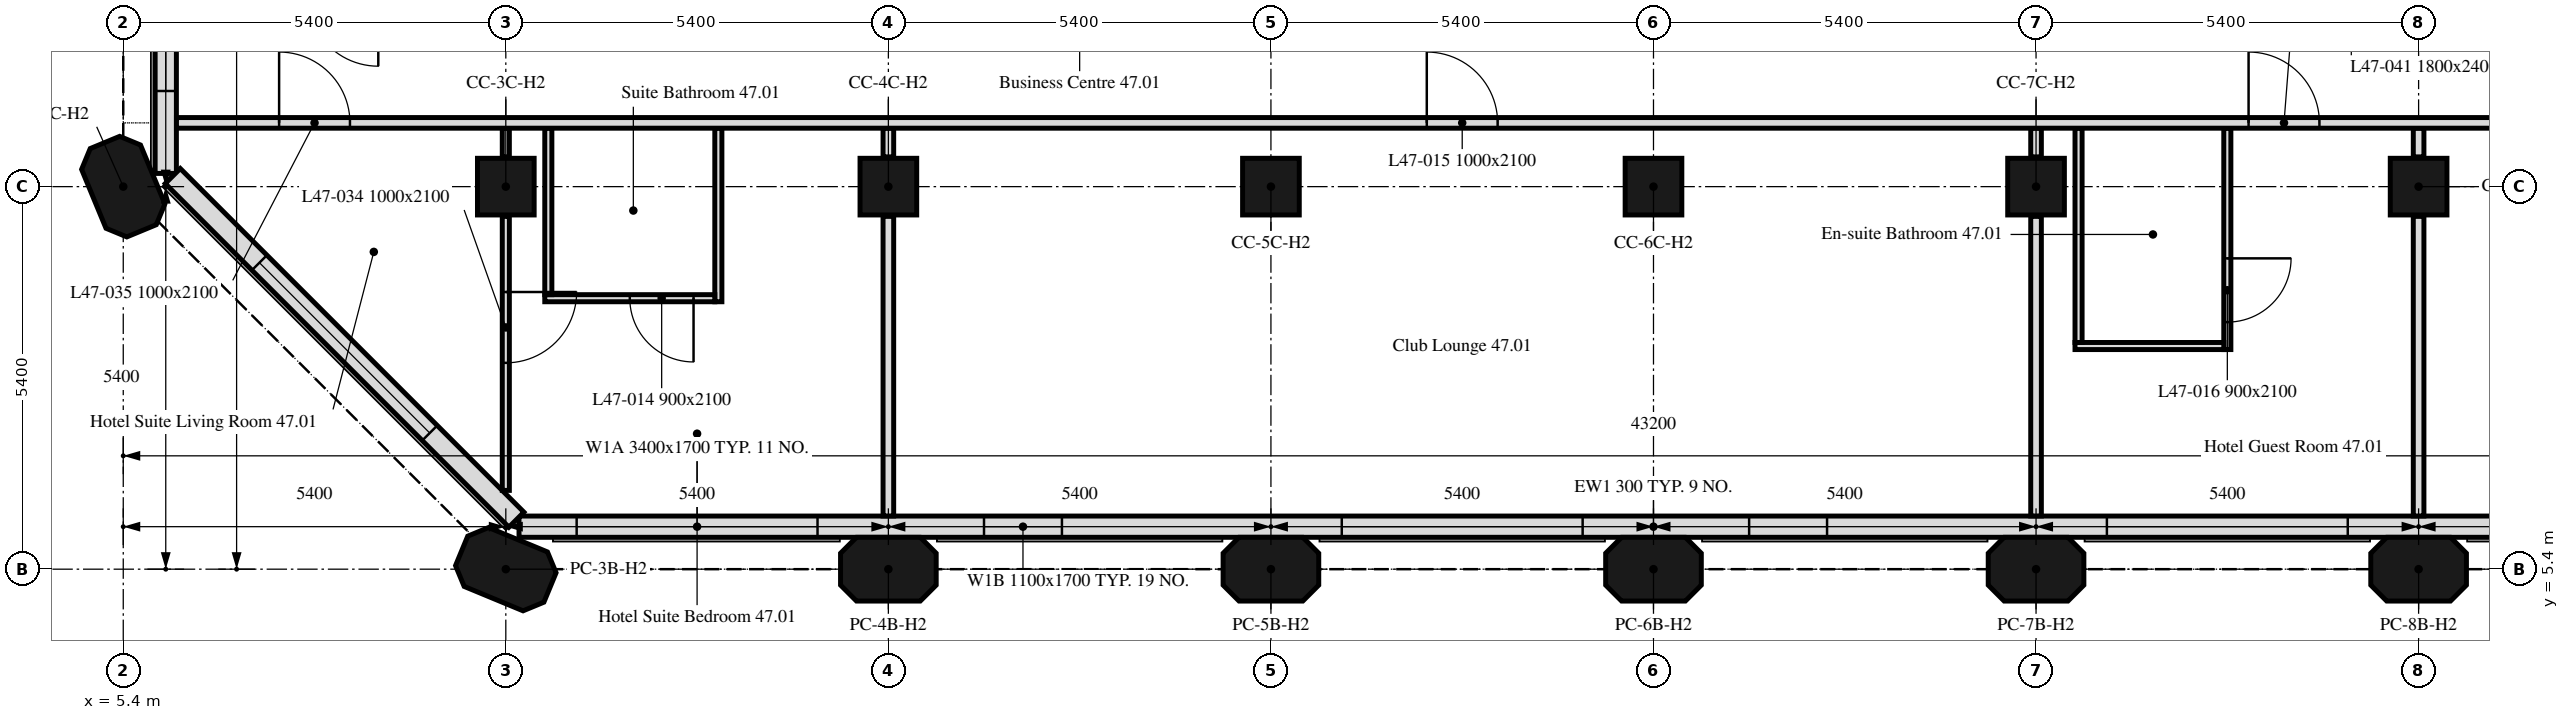
"""IFC4 building model, lengths in metres.
Left out: names, types, materials, properties, quantities, classifications, styles, units other than length and angle.
Written with IfcOpenShell. Run it as: python <this file> out.ifc"""

import sys

from ifc_helpers import new_model, si_unit, direction, frame, frame_2d, origin, origin_2d, place, context, subcontext, project, spatial, polyline, rectangle, outline, extrude, element, fill, save


model = new_model("IFC4")
c1 = context("Model", 3, precision=1e-05, world=origin(), true_north=direction((0.0, 1.0)))
c2 = subcontext(c1, "Body", "Model", "MODEL_VIEW")
j1 = project(units=[si_unit("LENGTHUNIT", "METRE"), si_unit("PLANEANGLEUNIT", "RADIAN")], contexts=[c1])
p1 = place(None, origin())
s1 = spatial("IfcSite", under=j1, at=p1, CompositionType="ELEMENT")
p2 = place(p1, origin())
s2 = spatial("IfcBuilding", under=s1, at=p2, CompositionType="ELEMENT")
p3 = place(p2, frame((0.0, 0.0, 193.9)))
s3 = spatial("IfcBuildingStorey", under=s2, at=p3, CompositionType="ELEMENT", Elevation=193.9)
for number, where, z_axis, x_axis in (
    (1, (10.8, 5.4, 0.0), (0.0, 0.0, 1.0), (-0.924, 0.383, 0.0)),
    (2, (16.2, 5.4, 0.0), (0.0, 0.0, 1.0), (1.0, 0.0, 0.0)),
    (3, (21.6, 5.4, 0.0), (0.0, 0.0, 1.0), (1.0, 0.0, 0.0)),
    (4, (27.0, 5.4, 0.0), (0.0, 0.0, 1.0), (1.0, 0.0, 0.0)),
    (5, (32.4, 5.4, 0.0), (0.0, 0.0, 1.0), (1.0, 0.0, 0.0)),
    (6, (37.8, 5.4, 0.0), (0.0, 0.0, 1.0), (1.0, 0.0, 0.0)),
    (7, (5.4, 10.8, 0.0), (0.0, 0.0, 1.0), (-0.383, 0.924, 0.0)),
):
    element("IfcColumn", number, at=place(p3, frame(where, z_axis=z_axis, x_axis=x_axis)), inside=s3, PredefinedType="COLUMN", context=c2, shape_type="SweptSolid", body=[
        extrude(outline(polyline([(-0.45, -0.45), (0.45, -0.45), (0.675, -0.225), (0.675, 0.225), (0.45, 0.45), (-0.45, 0.45), (-0.675, 0.225), (-0.675, -0.225), (-0.45, -0.45)])), origin(), (0.0, 0.0, 1.0), 3.0),
    ])
for number, where, z_axis, x_axis in (
    (8, (10.8, 10.8, 0.0), (0.0, 0.0, 1.0), (1.0, 0.0, 0.0)),
    (9, (16.2, 10.8, 0.0), (0.0, 0.0, 1.0), (1.0, 0.0, 0.0)),
    (10, (21.6, 10.8, 0.0), (0.0, 0.0, 1.0), (1.0, 0.0, 0.0)),
    (11, (27.0, 10.8, 0.0), (0.0, 0.0, 1.0), (1.0, 0.0, 0.0)),
    (12, (32.4, 10.8, 0.0), (0.0, 0.0, 1.0), (1.0, 0.0, 0.0)),
    (13, (37.8, 10.8, 0.0), (0.0, 0.0, 1.0), (1.0, 0.0, 0.0)),
):
    element("IfcColumn", number, at=place(p3, frame(where, z_axis=z_axis, x_axis=x_axis)), inside=s3, PredefinedType="COLUMN", context=c2, shape_type="SweptSolid", body=[
        extrude(rectangle(XDim=0.8, YDim=0.8, at=origin_2d()), origin(), (0.0, 0.0, 1.0), 3.0),
    ])
p4 = place(p3, frame((10.986, 6.0, 0.0), z_axis=(0.0, 0.0, 1.0), x_axis=(1.0, 0.0, 0.0)))
e14 = element("IfcWall", 14, at=p4, inside=s3, PredefinedType="SOLIDWALL", context=c2, shape_type="SweptSolid", body=[
    extrude(rectangle(XDim=32.027, YDim=0.3, at=frame_2d((16.014, 0.0))), origin(), (0.0, 0.0, 1.0), 3.0),
])
p5 = place(p4, frame((0.814, 0.0, 0.9)))
e15 = element("IfcOpeningElement", 15, at=p5, cuts=e14, PredefinedType="OPENING", context=c2, shape_type="SweptSolid", body=[
    extrude(rectangle(XDim=3.4, YDim=1.7, at=frame_2d((1.7, 0.85))), frame((0.0, 0.16, 0.0), z_axis=(0.0, -1.0, 0.0), x_axis=(1.0, 0.0, 0.0)), (0.0, 0.0, 1.0), 0.32),
])
p6 = place(p4, frame((6.564, 0.0, 0.9)))
e16 = element("IfcOpeningElement", 16, at=p6, cuts=e14, PredefinedType="OPENING", context=c2, shape_type="SweptSolid", body=[
    extrude(rectangle(XDim=1.1, YDim=1.7, at=frame_2d((0.55, 0.85))), frame((0.0, 0.16, 0.0), z_axis=(0.0, -1.0, 0.0), x_axis=(1.0, 0.0, 0.0)), (0.0, 0.0, 1.0), 0.32),
])
p7 = place(p4, frame((11.614, 0.0, 0.9)))
e17 = element("IfcOpeningElement", 17, at=p7, cuts=e14, PredefinedType="OPENING", context=c2, shape_type="SweptSolid", body=[
    extrude(rectangle(XDim=3.4, YDim=1.7, at=frame_2d((1.7, 0.85))), frame((0.0, 0.16, 0.0), z_axis=(0.0, -1.0, 0.0), x_axis=(1.0, 0.0, 0.0)), (0.0, 0.0, 1.0), 0.32),
])
p8 = place(p4, frame((17.364, 0.0, 0.9)))
e18 = element("IfcOpeningElement", 18, at=p8, cuts=e14, PredefinedType="OPENING", context=c2, shape_type="SweptSolid", body=[
    extrude(rectangle(XDim=1.1, YDim=1.7, at=frame_2d((0.55, 0.85))), frame((0.0, 0.16, 0.0), z_axis=(0.0, -1.0, 0.0), x_axis=(1.0, 0.0, 0.0)), (0.0, 0.0, 1.0), 0.32),
])
p9 = place(p4, frame((22.414, 0.0, 0.9)))
e19 = element("IfcOpeningElement", 19, at=p9, cuts=e14, PredefinedType="OPENING", context=c2, shape_type="SweptSolid", body=[
    extrude(rectangle(XDim=3.4, YDim=1.7, at=frame_2d((1.7, 0.85))), frame((0.0, 0.16, 0.0), z_axis=(0.0, -1.0, 0.0), x_axis=(1.0, 0.0, 0.0)), (0.0, 0.0, 1.0), 0.32),
])
p10 = place(p4, frame((28.164, 0.0, 0.9)))
e20 = element("IfcOpeningElement", 20, at=p10, cuts=e14, PredefinedType="OPENING", context=c2, shape_type="SweptSolid", body=[
    extrude(rectangle(XDim=1.1, YDim=1.7, at=frame_2d((0.55, 0.85))), frame((0.0, 0.16, 0.0), z_axis=(0.0, -1.0, 0.0), x_axis=(1.0, 0.0, 0.0)), (0.0, 0.0, 1.0), 0.32),
])
p11 = place(p3, frame((6.0, 16.2, 0.0), z_axis=(0.0, 0.0, 1.0), x_axis=(0.0, -1.0, 0.0)))
e21 = element("IfcWall", 21, at=p11, inside=s3, PredefinedType="SOLIDWALL", context=c2, shape_type="SweptSolid", body=[
    extrude(rectangle(XDim=5.214, YDim=0.3, at=frame_2d((2.607, 0.0))), origin(), (0.0, 0.0, 1.0), 3.0),
])
p12 = place(p11, frame((1.35, 0.0, 0.9)))
e22 = element("IfcOpeningElement", 22, at=p12, cuts=e21, PredefinedType="OPENING", context=c2, shape_type="SweptSolid", body=[
    extrude(rectangle(XDim=1.1, YDim=1.7, at=frame_2d((0.55, 0.85))), frame((0.0, 0.16, 0.0), z_axis=(0.0, -1.0, 0.0), x_axis=(1.0, 0.0, 0.0)), (0.0, 0.0, 1.0), 0.32),
])
p13 = place(p11, frame((2.95, 0.0, 0.9)))
e23 = element("IfcOpeningElement", 23, at=p13, cuts=e21, PredefinedType="OPENING", context=c2, shape_type="SweptSolid", body=[
    extrude(rectangle(XDim=1.1, YDim=1.7, at=frame_2d((0.55, 0.85))), frame((0.0, 0.16, 0.0), z_axis=(0.0, -1.0, 0.0), x_axis=(1.0, 0.0, 0.0)), (0.0, 0.0, 1.0), 0.32),
])
p14 = place(p3, frame((6.099, 10.949, 0.0), z_axis=(0.0, 0.0, 1.0), x_axis=(0.707106781187, -0.707106781187, 0.0)))
e24 = element("IfcWall", 24, at=p14, inside=s3, PredefinedType="SOLIDWALL", context=c2, shape_type="SweptSolid", body=[
    extrude(rectangle(XDim=6.86, YDim=0.3, at=frame_2d((3.43, 0.0))), origin(), (0.0, 0.0, 1.0), 3.0),
])
p15 = place(p14, frame((1.73, 0.0, 0.9)))
e25 = element("IfcOpeningElement", 25, at=p15, cuts=e24, PredefinedType="OPENING", context=c2, shape_type="SweptSolid", body=[
    extrude(rectangle(XDim=3.4, YDim=1.7, at=frame_2d((1.7, 0.85))), frame((0.0, 0.16, 0.0), z_axis=(0.0, -1.0, 0.0), x_axis=(1.0, 0.0, 0.0)), (0.0, 0.0, 1.0), 0.32),
])
p16 = place(p3, frame((16.2, 6.151, 0.0), z_axis=(0.0, 0.0, 1.0), x_axis=(0.0, 1.0, 0.0)))
e26 = element("IfcWall", 26, at=p16, inside=s3, PredefinedType="PARTITIONING", context=c2, shape_type="SweptSolid", body=[
    extrude(rectangle(XDim=4.229, YDim=0.15, at=frame_2d((2.115, 0.0))), origin(), (0.0, 0.0, 1.0), 3.0),
])
p17 = place(p3, frame((16.2, 11.22, 0.0), z_axis=(0.0, 0.0, 1.0), x_axis=(0.0, 1.0, 0.0)))
e27 = element("IfcWall", 27, at=p17, inside=s3, PredefinedType="PARTITIONING", context=c2, shape_type="SweptSolid", body=[
    extrude(rectangle(XDim=0.405, YDim=0.15, at=frame_2d((0.203, 0.0))), origin(), (0.0, 0.0, 1.0), 3.0),
])
p18 = place(p3, frame((13.8, 11.625, 0.0), z_axis=(0.0, 0.0, 1.0), x_axis=(0.0, -1.0, 0.0)))
e28 = element("IfcWall", 28, at=p18, inside=s3, PredefinedType="PARTITIONING", context=c2, shape_type="SweptSolid", body=[
    extrude(rectangle(XDim=2.45, YDim=0.1, at=frame_2d((1.225, 0.0))), origin(), (0.0, 0.0, 1.0), 3.0),
])
p19 = place(p3, frame((13.75, 9.225, 0.0), z_axis=(0.0, 0.0, 1.0), x_axis=(-1.0, 0.0, 0.0)))
e29 = element("IfcWall", 29, at=p19, inside=s3, PredefinedType="PARTITIONING", context=c2, shape_type="SweptSolid", body=[
    extrude(rectangle(XDim=2.4, YDim=0.1, at=frame_2d((1.2, 0.0))), origin(), (0.0, 0.0, 1.0), 3.0),
])
p20 = place(p19, frame((0.3, 0.0, 0.0)))
e30 = element("IfcOpeningElement", 30, at=p20, cuts=e29, PredefinedType="OPENING", context=c2, shape_type="SweptSolid", body=[
    extrude(rectangle(XDim=0.9, YDim=2.1, at=frame_2d((0.45, 1.05))), frame((0.0, 0.05, 0.0), z_axis=(0.0, -1.0, 0.0), x_axis=(1.0, 0.0, 0.0)), (0.0, 0.0, 1.0), 0.1),
])
p21 = place(p3, frame((11.4, 9.275, 0.0), z_axis=(0.0, 0.0, 1.0), x_axis=(0.0, 1.0, 0.0)))
e31 = element("IfcWall", 31, at=p21, inside=s3, PredefinedType="PARTITIONING", context=c2, shape_type="SweptSolid", body=[
    extrude(rectangle(XDim=2.35, YDim=0.1, at=frame_2d((1.175, 0.0))), origin(), (0.0, 0.0, 1.0), 3.0),
])
p22 = place(p3, frame((10.8, 11.625, 0.0), z_axis=(0.0, 0.0, 1.0), x_axis=(0.0, -1.0, 0.0)))
e32 = element("IfcWall", 32, at=p22, inside=s3, PredefinedType="PARTITIONING", context=c2, shape_type="SweptSolid", body=[
    extrude(rectangle(XDim=0.405, YDim=0.1, at=frame_2d((0.203, 0.0))), origin(), (0.0, 0.0, 1.0), 3.0),
])
p23 = place(p3, frame((10.8, 10.38, 0.0), z_axis=(0.0, 0.0, 1.0), x_axis=(0.0, -1.0, 0.0)))
e33 = element("IfcWall", 33, at=p23, inside=s3, PredefinedType="PARTITIONING", context=c2, shape_type="SweptSolid", body=[
    extrude(rectangle(XDim=3.868, YDim=0.1, at=frame_2d((1.934, 0.0))), origin(), (0.0, 0.0, 1.0), 3.0),
])
p24 = place(p23, frame((1.067, 0.0, 0.0)))
e34 = element("IfcOpeningElement", 34, at=p24, cuts=e33, PredefinedType="OPENING", context=c2, shape_type="SweptSolid", body=[
    extrude(rectangle(XDim=1.0, YDim=2.1, at=frame_2d((0.5, 1.05))), frame((0.0, 0.05, 0.0), z_axis=(0.0, -1.0, 0.0), x_axis=(1.0, 0.0, 0.0)), (0.0, 0.0, 1.0), 0.1),
])
p25 = place(p3, frame((32.4, 6.151, 0.0), z_axis=(0.0, 0.0, 1.0), x_axis=(0.0, 1.0, 0.0)))
e35 = element("IfcWall", 35, at=p25, inside=s3, PredefinedType="PARTITIONING", context=c2, shape_type="SweptSolid", body=[
    extrude(rectangle(XDim=4.229, YDim=0.15, at=frame_2d((2.115, 0.0))), origin(), (0.0, 0.0, 1.0), 3.0),
])
p26 = place(p3, frame((32.4, 11.22, 0.0), z_axis=(0.0, 0.0, 1.0), x_axis=(0.0, 1.0, 0.0)))
e36 = element("IfcWall", 36, at=p26, inside=s3, PredefinedType="PARTITIONING", context=c2, shape_type="SweptSolid", body=[
    extrude(rectangle(XDim=0.405, YDim=0.15, at=frame_2d((0.203, 0.0))), origin(), (0.0, 0.0, 1.0), 3.0),
])
p27 = place(p3, frame((37.8, 6.151, 0.0), z_axis=(0.0, 0.0, 1.0), x_axis=(0.0, 1.0, 0.0)))
e37 = element("IfcWall", 37, at=p27, inside=s3, PredefinedType="PARTITIONING", context=c2, shape_type="SweptSolid", body=[
    extrude(rectangle(XDim=4.229, YDim=0.15, at=frame_2d((2.115, 0.0))), origin(), (0.0, 0.0, 1.0), 3.0),
])
p28 = place(p3, frame((37.8, 11.22, 0.0), z_axis=(0.0, 0.0, 1.0), x_axis=(0.0, 1.0, 0.0)))
e38 = element("IfcWall", 38, at=p28, inside=s3, PredefinedType="PARTITIONING", context=c2, shape_type="SweptSolid", body=[
    extrude(rectangle(XDim=0.405, YDim=0.15, at=frame_2d((0.203, 0.0))), origin(), (0.0, 0.0, 1.0), 3.0),
])
p29 = place(p3, frame((35.1, 11.625, 0.0), z_axis=(0.0, 0.0, 1.0), x_axis=(0.0, -1.0, 0.0)))
e39 = element("IfcWall", 39, at=p29, inside=s3, PredefinedType="PARTITIONING", context=c2, shape_type="SweptSolid", body=[
    extrude(rectangle(XDim=3.125, YDim=0.1, at=frame_2d((1.562, 0.0))), origin(), (0.0, 0.0, 1.0), 3.0),
])
p30 = place(p29, frame((1.837, 0.0, 0.0)))
e40 = element("IfcOpeningElement", 40, at=p30, cuts=e39, PredefinedType="OPENING", context=c2, shape_type="SweptSolid", body=[
    extrude(rectangle(XDim=0.9, YDim=2.1, at=frame_2d((0.45, 1.05))), frame((0.0, 0.05, 0.0), z_axis=(0.0, -1.0, 0.0), x_axis=(1.0, 0.0, 0.0)), (0.0, 0.0, 1.0), 0.1),
])
p31 = place(p3, frame((35.05, 8.55, 0.0), z_axis=(0.0, 0.0, 1.0), x_axis=(-1.0, 0.0, 0.0)))
e41 = element("IfcWall", 41, at=p31, inside=s3, PredefinedType="PARTITIONING", context=c2, shape_type="SweptSolid", body=[
    extrude(rectangle(XDim=2.1, YDim=0.1, at=frame_2d((1.05, 0.0))), origin(), (0.0, 0.0, 1.0), 3.0),
])
p32 = place(p3, frame((33.0, 8.6, 0.0), z_axis=(0.0, 0.0, 1.0), x_axis=(0.0, 1.0, 0.0)))
e42 = element("IfcWall", 42, at=p32, inside=s3, PredefinedType="PARTITIONING", context=c2, shape_type="SweptSolid", body=[
    extrude(rectangle(XDim=3.025, YDim=0.1, at=frame_2d((1.512, 0.0))), origin(), (0.0, 0.0, 1.0), 3.0),
])
p33 = place(p3, frame((6.151, 11.7, 0.0), z_axis=(0.0, 0.0, 1.0), x_axis=(1.0, 0.0, 0.0)))
e43 = element("IfcWall", 43, at=p33, inside=s3, PredefinedType="PARTITIONING", context=c2, shape_type="SweptSolid", body=[
    extrude(rectangle(XDim=41.698, YDim=0.15, at=frame_2d((20.849, 0.0))), origin(), (0.0, 0.0, 1.0), 3.0),
])
p34 = place(p33, frame((17.649, 0.0, 0.0)))
e44 = element("IfcOpeningElement", 44, at=p34, cuts=e43, PredefinedType="OPENING", context=c2, shape_type="SweptSolid", body=[
    extrude(rectangle(XDim=1.0, YDim=2.1, at=frame_2d((0.5, 1.05))), frame((0.0, 0.075, 0.0), z_axis=(0.0, -1.0, 0.0), x_axis=(1.0, 0.0, 0.0)), (0.0, 0.0, 1.0), 0.15),
])
p35 = place(p33, frame((1.449, 0.0, 0.0)))
e45 = element("IfcOpeningElement", 45, at=p35, cuts=e43, PredefinedType="OPENING", context=c2, shape_type="SweptSolid", body=[
    extrude(rectangle(XDim=1.0, YDim=2.1, at=frame_2d((0.5, 1.05))), frame((0.0, 0.075, 0.0), z_axis=(0.0, -1.0, 0.0), x_axis=(1.0, 0.0, 0.0)), (0.0, 0.0, 1.0), 0.15),
])
p36 = place(p33, frame((29.249, 0.0, 0.0)))
e46 = element("IfcOpeningElement", 46, at=p36, cuts=e43, PredefinedType="OPENING", context=c2, shape_type="SweptSolid", body=[
    extrude(rectangle(XDim=1.0, YDim=2.1, at=frame_2d((0.5, 1.05))), frame((0.0, 0.075, 0.0), z_axis=(0.0, -1.0, 0.0), x_axis=(1.0, 0.0, 0.0)), (0.0, 0.0, 1.0), 0.15),
])
p37 = place(p33, frame((37.954, 0.0, 0.0)))
e47 = element("IfcOpeningElement", 47, at=p37, cuts=e43, PredefinedType="OPENING", context=c2, shape_type="SweptSolid", body=[
    extrude(rectangle(XDim=1.0, YDim=2.1, at=frame_2d((0.5, 1.05))), frame((0.0, 0.075, 0.0), z_axis=(0.0, -1.0, 0.0), x_axis=(1.0, 0.0, 0.0)), (0.0, 0.0, 1.0), 0.15),
])
p38 = place(p5, origin())
e48 = element("IfcWindow", 48, at=p38, inside=s3, PartitioningType="SINGLE_PANEL", PredefinedType="WINDOW", context=c2, shape_type="SweptSolid", body=[
    extrude(rectangle(XDim=3.4, YDim=1.7, at=frame_2d((1.7, 0.85))), frame((0.0, 0.03, 0.0), z_axis=(0.0, -1.0, 0.0), x_axis=(1.0, 0.0, 0.0)), (0.0, 0.0, 1.0), 0.06),
])
fill(e15, e48)
p39 = place(p6, origin())
e49 = element("IfcWindow", 49, at=p39, inside=s3, PartitioningType="SINGLE_PANEL", PredefinedType="WINDOW", context=c2, shape_type="SweptSolid", body=[
    extrude(rectangle(XDim=1.1, YDim=1.7, at=frame_2d((0.55, 0.85))), frame((0.0, 0.03, 0.0), z_axis=(0.0, -1.0, 0.0), x_axis=(1.0, 0.0, 0.0)), (0.0, 0.0, 1.0), 0.06),
])
fill(e16, e49)
p40 = place(p7, origin())
e50 = element("IfcWindow", 50, at=p40, inside=s3, PartitioningType="SINGLE_PANEL", PredefinedType="WINDOW", context=c2, shape_type="SweptSolid", body=[
    extrude(rectangle(XDim=3.4, YDim=1.7, at=frame_2d((1.7, 0.85))), frame((0.0, 0.03, 0.0), z_axis=(0.0, -1.0, 0.0), x_axis=(1.0, 0.0, 0.0)), (0.0, 0.0, 1.0), 0.06),
])
fill(e17, e50)
p41 = place(p8, origin())
e51 = element("IfcWindow", 51, at=p41, inside=s3, PartitioningType="SINGLE_PANEL", PredefinedType="WINDOW", context=c2, shape_type="SweptSolid", body=[
    extrude(rectangle(XDim=1.1, YDim=1.7, at=frame_2d((0.55, 0.85))), frame((0.0, 0.03, 0.0), z_axis=(0.0, -1.0, 0.0), x_axis=(1.0, 0.0, 0.0)), (0.0, 0.0, 1.0), 0.06),
])
fill(e18, e51)
p42 = place(p9, origin())
e52 = element("IfcWindow", 52, at=p42, inside=s3, PartitioningType="SINGLE_PANEL", PredefinedType="WINDOW", context=c2, shape_type="SweptSolid", body=[
    extrude(rectangle(XDim=3.4, YDim=1.7, at=frame_2d((1.7, 0.85))), frame((0.0, 0.03, 0.0), z_axis=(0.0, -1.0, 0.0), x_axis=(1.0, 0.0, 0.0)), (0.0, 0.0, 1.0), 0.06),
])
fill(e19, e52)
p43 = place(p13, origin())
e53 = element("IfcWindow", 53, at=p43, inside=s3, PartitioningType="SINGLE_PANEL", PredefinedType="WINDOW", context=c2, shape_type="SweptSolid", body=[
    extrude(rectangle(XDim=1.1, YDim=1.7, at=frame_2d((0.55, 0.85))), frame((0.0, 0.03, 0.0), z_axis=(0.0, -1.0, 0.0), x_axis=(1.0, 0.0, 0.0)), (0.0, 0.0, 1.0), 0.06),
])
fill(e23, e53)
p44 = place(p15, origin())
e54 = element("IfcWindow", 54, at=p44, inside=s3, PartitioningType="SINGLE_PANEL", PredefinedType="WINDOW", context=c2, shape_type="SweptSolid", body=[
    extrude(rectangle(XDim=3.4, YDim=1.7, at=frame_2d((1.7, 0.85))), frame((0.0, 0.03, 0.0), z_axis=(0.0, -1.0, 0.0), x_axis=(1.0, 0.0, 0.0)), (0.0, 0.0, 1.0), 0.06),
])
fill(e25, e54)
p45 = place(p20, origin())
e55 = element("IfcDoor", 55, at=p45, inside=s3, OperationType="SINGLE_SWING_RIGHT", PredefinedType="DOOR", context=c2, shape_type="SweptSolid", body=[
    extrude(rectangle(XDim=0.9, YDim=2.1, at=frame_2d((0.45, 1.05))), frame((0.0, 0.025, 0.0), z_axis=(0.0, -1.0, 0.0), x_axis=(1.0, 0.0, 0.0)), (0.0, 0.0, 1.0), 0.05),
])
fill(e30, e55)
p46 = place(p34, origin())
e56 = element("IfcDoor", 56, at=p46, inside=s3, OperationType="SINGLE_SWING_RIGHT", PredefinedType="DOOR", context=c2, shape_type="SweptSolid", body=[
    extrude(rectangle(XDim=1.0, YDim=2.1, at=frame_2d((0.5, 1.05))), frame((0.0, 0.025, 0.0), z_axis=(0.0, -1.0, 0.0), x_axis=(1.0, 0.0, 0.0)), (0.0, 0.0, 1.0), 0.05),
])
fill(e44, e56)
p47 = place(p30, origin())
e57 = element("IfcDoor", 57, at=p47, inside=s3, OperationType="SINGLE_SWING_LEFT", PredefinedType="DOOR", context=c2, shape_type="SweptSolid", body=[
    extrude(rectangle(XDim=0.9, YDim=2.1, at=frame_2d((0.45, 1.05))), frame((0.0, 0.025, 0.0), z_axis=(0.0, -1.0, 0.0), x_axis=(1.0, 0.0, 0.0)), (0.0, 0.0, 1.0), 0.05),
])
fill(e40, e57)
p48 = place(p24, origin())
e58 = element("IfcDoor", 58, at=p48, inside=s3, OperationType="SINGLE_SWING_RIGHT", PredefinedType="DOOR", context=c2, shape_type="SweptSolid", body=[
    extrude(rectangle(XDim=1.0, YDim=2.1, at=frame_2d((0.5, 1.05))), frame((0.0, 0.025, 0.0), z_axis=(0.0, -1.0, 0.0), x_axis=(1.0, 0.0, 0.0)), (0.0, 0.0, 1.0), 0.05),
])
fill(e34, e58)
p49 = place(p35, origin())
e59 = element("IfcDoor", 59, at=p49, inside=s3, OperationType="SINGLE_SWING_LEFT", PredefinedType="DOOR", context=c2, shape_type="SweptSolid", body=[
    extrude(rectangle(XDim=1.0, YDim=2.1, at=frame_2d((0.5, 1.05))), frame((0.0, 0.025, 0.0), z_axis=(0.0, -1.0, 0.0), x_axis=(1.0, 0.0, 0.0)), (0.0, 0.0, 1.0), 0.05),
])
fill(e45, e59)
p50 = place(p36, origin())
e60 = element("IfcDoor", 60, at=p50, inside=s3, OperationType="SINGLE_SWING_LEFT", PredefinedType="DOOR", context=c2, shape_type="SweptSolid", body=[
    extrude(rectangle(XDim=1.0, YDim=2.1, at=frame_2d((0.5, 1.05))), frame((0.0, 0.025, 0.0), z_axis=(0.0, -1.0, 0.0), x_axis=(1.0, 0.0, 0.0)), (0.0, 0.0, 1.0), 0.05),
])
fill(e46, e60)
save(model, sys.argv[1])
